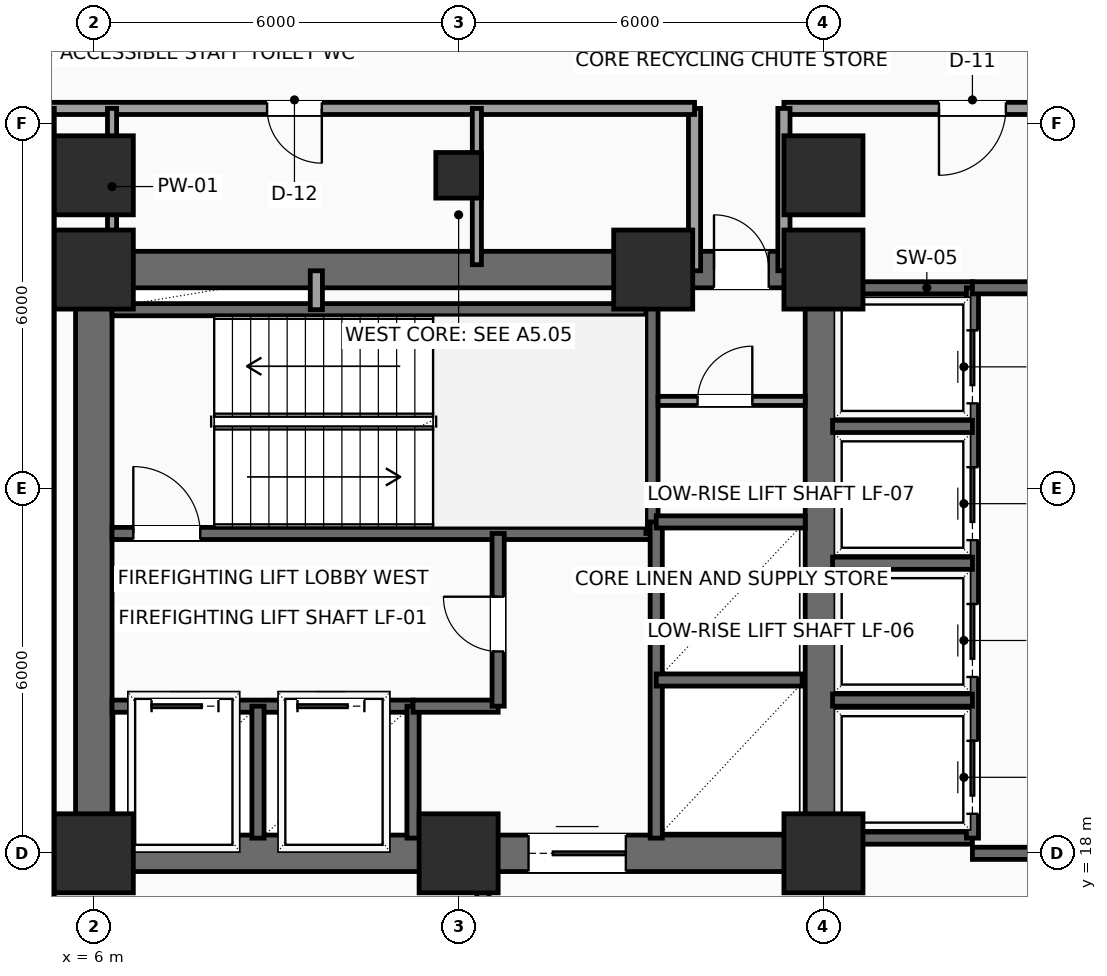
"""IFC4 building model, lengths in metres.
Left out: names, types, materials, properties, quantities, classifications, styles, units other than length and angle.
Written with IfcOpenShell. Run it as: python <this file> out.ifc"""

import sys

from ifc_helpers import new_model, si_unit, direction, frame, frame_2d, origin, origin_2d, place, context, subcontext, project, spatial, rectangle, hollow_rectangle, extrude, element, fill, save


model = new_model("IFC4")
c1 = context("Model", 3, precision=1e-05, world=origin(), true_north=direction((0.0, 1.0)))
c2 = subcontext(c1, "Body", "Model", "MODEL_VIEW")
j1 = project(units=[si_unit("LENGTHUNIT", "METRE"), si_unit("PLANEANGLEUNIT", "RADIAN")], contexts=[c1])
p1 = place(None, origin())
s1 = spatial("IfcSite", under=j1, at=p1, CompositionType="ELEMENT")
p2 = place(p1, origin())
s2 = spatial("IfcBuilding", under=s1, at=p2, CompositionType="ELEMENT")
p3 = place(p2, frame((0.0, 0.0, 79.2)))
s3 = spatial("IfcBuildingStorey", under=s2, at=p3, CompositionType="ELEMENT", Elevation=79.2)
for number, where, z_axis, x_axis in (
    (1, (6.0, 18.0, 0.0), (0.0, 0.0, 1.0), (1.0, 0.0, 0.0)),
    (2, (12.0, 18.0, 0.0), (0.0, 0.0, 1.0), (1.0, 0.0, 0.0)),
    (3, (18.0, 18.0, 0.0), (0.0, 0.0, 1.0), (1.0, 0.0, 0.0)),
    (4, (6.0, 27.6, 0.0), (0.0, 0.0, 1.0), (1.0, 0.0, 0.0)),
    (5, (15.2, 27.6, 0.0), (0.0, 0.0, 1.0), (1.0, 0.0, 0.0)),
    (6, (18.0, 27.6, 0.0), (0.0, 0.0, 1.0), (1.0, 0.0, 0.0)),
    (7, (6.0, 29.15, 0.0), (0.0, 0.0, 1.0), (1.0, 0.0, 0.0)),
):
    element("IfcColumn", number, at=place(p3, frame(where, z_axis=z_axis, x_axis=x_axis)), inside=s3, PredefinedType="COLUMN", context=c2, shape_type="SweptSolid", body=[
        extrude(rectangle(XDim=1.3, YDim=1.3, at=origin_2d()), origin(), (0.0, 0.0, 1.0), 3.9),
    ])
p4 = place(p3, frame((12.0, 29.15, 0.0), z_axis=(0.0, 0.0, 1.0), x_axis=(1.0, 0.0, 0.0)))
e8 = element("IfcColumn", 8, at=p4, inside=s3, PredefinedType="COLUMN", context=c2, shape_type="SweptSolid", body=[
    extrude(hollow_rectangle(XDim=0.75, YDim=0.75, WallThickness=0.035, InnerFilletRadius=0.035, OuterFilletRadius=0.05, at=origin_2d()), origin(), (0.0, 0.0, 1.0), 3.9),
])
p5 = place(p3, frame((18.0, 29.15, 0.0), z_axis=(0.0, 0.0, 1.0), x_axis=(1.0, 0.0, 0.0)))
e9 = element("IfcColumn", 9, at=p5, inside=s3, PredefinedType="COLUMN", context=c2, shape_type="SweptSolid", body=[
    extrude(rectangle(XDim=1.3, YDim=1.3, at=origin_2d()), origin(), (0.0, 0.0, 1.0), 3.9),
])
p6 = place(p3, frame((6.0, 18.0, 0.0), z_axis=(0.0, 0.0, 1.0), x_axis=(1.0, 0.0, 0.0)))
e10 = element("IfcWall", 10, at=p6, inside=s3, PredefinedType="SHEAR", context=c2, shape_type="SweptSolid", body=[
    extrude(rectangle(XDim=12.0, YDim=0.6, at=frame_2d((6.0, 0.0))), origin(), (0.0, 0.0, 1.0), 3.65),
])
p7 = place(p6, frame((7.15, 0.0, 0.0)))
e11 = element("IfcOpeningElement", 11, at=p7, cuts=e10, PredefinedType="OPENING", context=c2, shape_type="SweptSolid", body=[
    extrude(rectangle(XDim=1.6, YDim=2.3, at=frame_2d((0.8, 1.15))), frame((0.0, 0.31, 0.0), z_axis=(0.0, -1.0, 0.0), x_axis=(1.0, 0.0, 0.0)), (0.0, 0.0, 1.0), 0.62),
])
p8 = place(p3, frame((6.0, 27.6, 0.0), z_axis=(0.0, 0.0, 1.0), x_axis=(1.0, 0.0, 0.0)))
e12 = element("IfcWall", 12, at=p8, inside=s3, PredefinedType="SHEAR", context=c2, shape_type="SweptSolid", body=[
    extrude(rectangle(XDim=12.0, YDim=0.6, at=frame_2d((6.0, 0.0))), origin(), (0.0, 0.0, 1.0), 3.65),
])
p9 = place(p8, frame((10.2, 0.0, 0.0)))
e13 = element("IfcOpeningElement", 13, at=p9, cuts=e12, PredefinedType="OPENING", context=c2, shape_type="SweptSolid", body=[
    extrude(rectangle(XDim=0.9, YDim=2.15, at=frame_2d((0.45, 1.075))), frame((0.0, 0.31, 0.0), z_axis=(0.0, -1.0, 0.0), x_axis=(1.0, 0.0, 0.0)), (0.0, 0.0, 1.0), 0.62),
])
for number, where, z_axis, x_axis in (
    (14, (6.0, 18.0, 0.0), (0.0, 0.0, 1.0), (0.0, 1.0, 0.0)),
    (15, (18.0, 18.0, 0.0), (0.0, 0.0, 1.0), (0.0, 1.0, 0.0)),
):
    element("IfcWall", number, at=place(p3, frame(where, z_axis=z_axis, x_axis=x_axis)), inside=s3, PredefinedType="SHEAR", context=c2, shape_type="SweptSolid", body=[
        extrude(rectangle(XDim=9.6, YDim=0.6, at=frame_2d((4.8, 0.0))), origin(), (0.0, 0.0, 1.0), 3.65),
    ])
p10 = place(p3, frame((6.3, 23.26, 0.0), z_axis=(0.0, 0.0, 1.0), x_axis=(1.0, 0.0, 0.0)))
e16 = element("IfcWall", 16, at=p10, inside=s3, PredefinedType="SHEAR", context=c2, shape_type="SweptSolid", body=[
    extrude(rectangle(XDim=8.88, YDim=0.2, at=frame_2d((4.44, 0.0))), origin(), (0.0, 0.0, 1.0), 3.65),
])
p11 = place(p10, frame((0.35, 0.0, 0.0)))
e17 = element("IfcOpeningElement", 17, at=p11, cuts=e16, PredefinedType="OPENING", context=c2, shape_type="SweptSolid", body=[
    extrude(rectangle(XDim=1.1, YDim=2.2, at=frame_2d((0.55, 1.1))), frame((0.0, 0.11, 0.0), z_axis=(0.0, -1.0, 0.0), x_axis=(1.0, 0.0, 0.0)), (0.0, 0.0, 1.0), 0.22),
])
p12 = place(p3, frame((6.3, 26.94, 0.0), z_axis=(0.0, 0.0, 1.0), x_axis=(1.0, 0.0, 0.0)))
e18 = element("IfcWall", 18, at=p12, inside=s3, PredefinedType="SHEAR", context=c2, shape_type="SweptSolid", body=[
    extrude(rectangle(XDim=8.88, YDim=0.2, at=frame_2d((4.44, 0.0))), origin(), (0.0, 0.0, 1.0), 3.65),
])
p13 = place(p3, frame((15.18, 23.26, 0.0), z_axis=(0.0, 0.0, 1.0), x_axis=(0.0, 1.0, 0.0)))
e19 = element("IfcWall", 19, at=p13, inside=s3, PredefinedType="SHEAR", context=c2, shape_type="SweptSolid", body=[
    extrude(rectangle(XDim=4.04, YDim=0.2, at=frame_2d((2.02, 0.0))), origin(), (0.0, 0.0, 1.0), 3.65),
])
p14 = place(p3, frame((6.3, 20.42, 0.0), z_axis=(0.0, 0.0, 1.0), x_axis=(1.0, 0.0, 0.0)))
e20 = element("IfcWall", 20, at=p14, inside=s3, PredefinedType="SHEAR", context=c2, shape_type="SweptSolid", body=[
    extrude(rectangle(XDim=4.95, YDim=0.2, at=frame_2d((2.475, 0.0))), origin(), (0.0, 0.0, 1.0), 3.65),
])
p15 = place(p14, frame((0.65, 0.0, 0.0)))
e21 = element("IfcOpeningElement", 21, at=p15, cuts=e20, PredefinedType="OPENING", context=c2, shape_type="SweptSolid", body=[
    extrude(rectangle(XDim=1.1, YDim=2.2, at=frame_2d((0.55, 1.1))), frame((0.0, 0.11, 0.0), z_axis=(0.0, -1.0, 0.0), x_axis=(1.0, 0.0, 0.0)), (0.0, 0.0, 1.0), 0.22),
])
p16 = place(p14, frame((3.05, 0.0, 0.0)))
e22 = element("IfcOpeningElement", 22, at=p16, cuts=e20, PredefinedType="OPENING", context=c2, shape_type="SweptSolid", body=[
    extrude(rectangle(XDim=1.1, YDim=2.2, at=frame_2d((0.55, 1.1))), frame((0.0, 0.11, 0.0), z_axis=(0.0, -1.0, 0.0), x_axis=(1.0, 0.0, 0.0)), (0.0, 0.0, 1.0), 0.22),
])
for number, where, z_axis, x_axis in (
    (23, (8.7, 18.25, 0.0), (0.0, 0.0, 1.0), (0.0, 1.0, 0.0)),
    (24, (11.25, 18.25, 0.0), (0.0, 0.0, 1.0), (0.0, 1.0, 0.0)),
):
    element("IfcWall", number, at=place(p3, frame(where, z_axis=z_axis, x_axis=x_axis)), inside=s3, PredefinedType="SHEAR", context=c2, shape_type="SweptSolid", body=[
        extrude(rectangle(XDim=2.17, YDim=0.2, at=frame_2d((1.085, 0.0))), origin(), (0.0, 0.0, 1.0), 3.65),
    ])
p17 = place(p3, frame((11.25, 20.42, 0.0), z_axis=(0.0, 0.0, 1.0), x_axis=(1.0, 0.0, 0.0)))
e25 = element("IfcWall", 25, at=p17, inside=s3, PredefinedType="SHEAR", context=c2, shape_type="SweptSolid", body=[
    extrude(rectangle(XDim=1.4, YDim=0.2, at=frame_2d((0.7, 0.0))), origin(), (0.0, 0.0, 1.0), 3.65),
])
p18 = place(p3, frame((12.65, 20.42, 0.0), z_axis=(0.0, 0.0, 1.0), x_axis=(0.0, 1.0, 0.0)))
e26 = element("IfcWall", 26, at=p18, inside=s3, PredefinedType="SHEAR", context=c2, shape_type="SweptSolid", body=[
    extrude(rectangle(XDim=2.84, YDim=0.2, at=frame_2d((1.42, 0.0))), origin(), (0.0, 0.0, 1.0), 3.65),
])
p19 = place(p18, frame((0.9, 0.0, 0.0)))
e27 = element("IfcOpeningElement", 27, at=p19, cuts=e26, PredefinedType="OPENING", context=c2, shape_type="SweptSolid", body=[
    extrude(rectangle(XDim=0.9, YDim=2.15, at=frame_2d((0.45, 1.075))), frame((0.0, 0.11, 0.0), z_axis=(0.0, -1.0, 0.0), x_axis=(1.0, 0.0, 0.0)), (0.0, 0.0, 1.0), 0.22),
])
p20 = place(p3, frame((9.66, 26.94, 0.0), z_axis=(0.0, 0.0, 1.0), x_axis=(0.0, 1.0, 0.0)))
e28 = element("IfcWall", 28, at=p20, inside=s3, PredefinedType="SOLIDWALL", context=c2, shape_type="SweptSolid", body=[
    extrude(rectangle(XDim=0.64, YDim=0.2, at=frame_2d((0.32, 0.0))), origin(), (0.0, 0.0, 1.0), 3.65),
])
p21 = place(p3, frame((15.25, 18.25, 0.0), z_axis=(0.0, 0.0, 1.0), x_axis=(0.0, 1.0, 0.0)))
e29 = element("IfcWall", 29, at=p21, inside=s3, PredefinedType="SHEAR", context=c2, shape_type="SweptSolid", body=[
    extrude(rectangle(XDim=5.2, YDim=0.2, at=frame_2d((2.6, 0.0))), origin(), (0.0, 0.0, 1.0), 3.65),
])
p22 = place(p3, frame((15.25, 20.85, 0.0), z_axis=(0.0, 0.0, 1.0), x_axis=(1.0, 0.0, 0.0)))
e30 = element("IfcWall", 30, at=p22, inside=s3, PredefinedType="SHEAR", context=c2, shape_type="SweptSolid", body=[
    extrude(rectangle(XDim=2.4, YDim=0.2, at=frame_2d((1.2, 0.0))), origin(), (0.0, 0.0, 1.0), 3.65),
])
p23 = place(p3, frame((15.25, 23.45, 0.0), z_axis=(0.0, 0.0, 1.0), x_axis=(1.0, 0.0, 0.0)))
e31 = element("IfcWall", 31, at=p23, inside=s3, PredefinedType="SHEAR", context=c2, shape_type="SweptSolid", body=[
    extrude(rectangle(XDim=2.45, YDim=0.2, at=frame_2d((1.225, 0.0))), origin(), (0.0, 0.0, 1.0), 3.65),
])
p24 = place(p3, frame((15.28, 25.44, 0.0), z_axis=(0.0, 0.0, 1.0), x_axis=(1.0, 0.0, 0.0)))
e32 = element("IfcWall", 32, at=p24, inside=s3, PredefinedType="PARTITIONING", context=c2, shape_type="SweptSolid", body=[
    extrude(rectangle(XDim=2.42, YDim=0.15, at=frame_2d((1.21, 0.0))), origin(), (0.0, 0.0, 1.0), 3.65),
])
p25 = place(p24, frame((0.65, 0.0, 0.0)))
e33 = element("IfcOpeningElement", 33, at=p25, cuts=e32, PredefinedType="OPENING", context=c2, shape_type="SweptSolid", body=[
    extrude(rectangle(XDim=0.9, YDim=2.15, at=frame_2d((0.45, 1.075))), frame((0.0, 0.085, 0.0), z_axis=(0.0, -1.0, 0.0), x_axis=(1.0, 0.0, 0.0)), (0.0, 0.0, 1.0), 0.17),
])
for number, where, z_axis, x_axis in (
    (34, (18.1, 27.3, 0.0), (0.0, 0.0, 1.0), (1.0, 0.0, 0.0)),
    (35, (18.1, 18.25, 0.0), (0.0, 0.0, 1.0), (1.0, 0.0, 0.0)),
):
    element("IfcWall", number, at=place(p3, frame(where, z_axis=z_axis, x_axis=x_axis)), inside=s3, PredefinedType="SHEAR", context=c2, shape_type="SweptSolid", body=[
        extrude(rectangle(XDim=2.35, YDim=0.2, at=frame_2d((1.175, 0.0))), origin(), (0.0, 0.0, 1.0), 3.65),
    ])
p26 = place(p3, frame((20.45, 18.25, 0.0), z_axis=(0.0, 0.0, 1.0), x_axis=(0.0, 1.0, 0.0)))
e36 = element("IfcWall", 36, at=p26, inside=s3, PredefinedType="SHEAR", context=c2, shape_type="SweptSolid", body=[
    extrude(rectangle(XDim=9.05, YDim=0.2, at=frame_2d((4.525, 0.0))), origin(), (0.0, 0.0, 1.0), 3.65),
])
p27 = place(p26, frame((0.4, 0.0, 0.0)))
e37 = element("IfcOpeningElement", 37, at=p27, cuts=e36, PredefinedType="OPENING", context=c2, shape_type="SweptSolid", body=[
    extrude(rectangle(XDim=1.2, YDim=2.2, at=frame_2d((0.6, 1.1))), frame((0.0, 0.11, 0.0), z_axis=(0.0, -1.0, 0.0), x_axis=(1.0, 0.0, 0.0)), (0.0, 0.0, 1.0), 0.22),
])
p28 = place(p26, frame((2.65, 0.0, 0.0)))
e38 = element("IfcOpeningElement", 38, at=p28, cuts=e36, PredefinedType="OPENING", context=c2, shape_type="SweptSolid", body=[
    extrude(rectangle(XDim=1.2, YDim=2.2, at=frame_2d((0.6, 1.1))), frame((0.0, 0.11, 0.0), z_axis=(0.0, -1.0, 0.0), x_axis=(1.0, 0.0, 0.0)), (0.0, 0.0, 1.0), 0.22),
])
p29 = place(p26, frame((4.9, 0.0, 0.0)))
e39 = element("IfcOpeningElement", 39, at=p29, cuts=e36, PredefinedType="OPENING", context=c2, shape_type="SweptSolid", body=[
    extrude(rectangle(XDim=1.2, YDim=2.2, at=frame_2d((0.6, 1.1))), frame((0.0, 0.11, 0.0), z_axis=(0.0, -1.0, 0.0), x_axis=(1.0, 0.0, 0.0)), (0.0, 0.0, 1.0), 0.22),
])
p30 = place(p26, frame((7.15, 0.0, 0.0)))
e40 = element("IfcOpeningElement", 40, at=p30, cuts=e36, PredefinedType="OPENING", context=c2, shape_type="SweptSolid", body=[
    extrude(rectangle(XDim=1.2, YDim=2.2, at=frame_2d((0.6, 1.1))), frame((0.0, 0.11, 0.0), z_axis=(0.0, -1.0, 0.0), x_axis=(1.0, 0.0, 0.0)), (0.0, 0.0, 1.0), 0.22),
])
for number, where, z_axis, x_axis in (
    (41, (18.15, 20.52, 0.0), (0.0, 0.0, 1.0), (1.0, 0.0, 0.0)),
    (42, (18.15, 22.77, 0.0), (0.0, 0.0, 1.0), (1.0, 0.0, 0.0)),
    (43, (18.15, 25.02, 0.0), (0.0, 0.0, 1.0), (1.0, 0.0, 0.0)),
):
    element("IfcWall", number, at=place(p3, frame(where, z_axis=z_axis, x_axis=x_axis)), inside=s3, PredefinedType="SHEAR", context=c2, shape_type="SweptSolid", body=[
        extrude(rectangle(XDim=2.3, YDim=0.2, at=frame_2d((1.15, 0.0))), origin(), (0.0, 0.0, 1.0), 3.65),
    ])
p31 = place(p3, frame((20.45, 18.0, 0.0), z_axis=(0.0, 0.0, 1.0), x_axis=(1.0, 0.0, 0.0)))
e44 = element("IfcWall", 44, at=p31, inside=s3, PredefinedType="SHEAR", context=c2, shape_type="SweptSolid", body=[
    extrude(rectangle(XDim=3.5, YDim=0.2, at=frame_2d((1.75, 0.0))), origin(), (0.0, 0.0, 1.0), 3.65),
])
p32 = place(p31, frame((0.95, 0.0, 0.0)))
e45 = element("IfcOpeningElement", 45, at=p32, cuts=e44, PredefinedType="OPENING", context=c2, shape_type="SweptSolid", body=[
    extrude(rectangle(XDim=1.6, YDim=2.3, at=frame_2d((0.8, 1.15))), frame((0.0, 0.11, 0.0), z_axis=(0.0, -1.0, 0.0), x_axis=(1.0, 0.0, 0.0)), (0.0, 0.0, 1.0), 0.22),
])
p33 = place(p3, frame((20.45, 27.3, 0.0), z_axis=(0.0, 0.0, 1.0), x_axis=(1.0, 0.0, 0.0)))
e46 = element("IfcWall", 46, at=p33, inside=s3, PredefinedType="SHEAR", context=c2, shape_type="SweptSolid", body=[
    extrude(rectangle(XDim=3.5, YDim=0.2, at=frame_2d((1.75, 0.0))), origin(), (0.0, 0.0, 1.0), 3.65),
])
p34 = place(p3, frame((23.7, 30.25, 0.0), z_axis=(0.0, 0.0, 1.0), x_axis=(-1.0, 0.0, 0.0)))
e47 = element("IfcWall", 47, at=p34, inside=s3, PredefinedType="PARTITIONING", context=c2, shape_type="SweptSolid", body=[
    extrude(rectangle(XDim=6.35, YDim=0.2, at=frame_2d((3.175, 0.0))), origin(), (0.0, 0.0, 1.0), 3.65),
])
p35 = place(p34, frame((2.7, 0.0, 0.0)))
e48 = element("IfcOpeningElement", 48, at=p35, cuts=e47, PredefinedType="OPENING", context=c2, shape_type="SweptSolid", body=[
    extrude(rectangle(XDim=1.1, YDim=2.25, at=frame_2d((0.55, 1.125))), frame((0.0, 0.11, 0.0), z_axis=(0.0, -1.0, 0.0), x_axis=(1.0, 0.0, 0.0)), (0.0, 0.0, 1.0), 0.22),
])
for number, where, z_axis, x_axis in (
    (49, (17.35, 30.25, 0.0), (0.0, 0.0, 1.0), (0.0, -1.0, 0.0)),
    (50, (15.88, 27.58, 0.0), (0.0, 0.0, 1.0), (0.0, 1.0, 0.0)),
):
    element("IfcWall", number, at=place(p3, frame(where, z_axis=z_axis, x_axis=x_axis)), inside=s3, PredefinedType="PARTITIONING", context=c2, shape_type="SweptSolid", body=[
        extrude(rectangle(XDim=2.67, YDim=0.2, at=frame_2d((1.335, 0.0))), origin(), (0.0, 0.0, 1.0), 3.65),
    ])
p36 = place(p3, frame((15.88, 30.25, 0.0), z_axis=(0.0, 0.0, 1.0), x_axis=(-1.0, 0.0, 0.0)))
e51 = element("IfcWall", 51, at=p36, inside=s3, PredefinedType="PARTITIONING", context=c2, shape_type="SweptSolid", body=[
    extrude(rectangle(XDim=10.63, YDim=0.2, at=frame_2d((5.315, 0.0))), origin(), (0.0, 0.0, 1.0), 3.65),
])
p37 = place(p36, frame((6.13, 0.0, 0.0)))
e52 = element("IfcOpeningElement", 52, at=p37, cuts=e51, PredefinedType="OPENING", context=c2, shape_type="SweptSolid", body=[
    extrude(rectangle(XDim=0.9, YDim=2.1, at=frame_2d((0.45, 1.05))), frame((0.0, 0.11, 0.0), z_axis=(0.0, -1.0, 0.0), x_axis=(1.0, 0.0, 0.0)), (0.0, 0.0, 1.0), 0.22),
])
p38 = place(p3, frame((5.25, 30.25, 0.0), z_axis=(0.0, 0.0, 1.0), x_axis=(0.0, -1.0, 0.0)))
e53 = element("IfcWall", 53, at=p38, inside=s3, PredefinedType="PARTITIONING", context=c2, shape_type="SweptSolid", body=[
    extrude(rectangle(XDim=14.1, YDim=0.2, at=frame_2d((7.05, 0.0))), origin(), (0.0, 0.0, 1.0), 3.65),
])
p39 = place(p3, frame((12.4, 16.15, 0.0), z_axis=(0.0, 0.0, 1.0), x_axis=(0.0, 1.0, 0.0)))
e54 = element("IfcWall", 54, at=p39, inside=s3, PredefinedType="PARTITIONING", context=c2, shape_type="SweptSolid", body=[
    extrude(rectangle(XDim=1.8, YDim=0.2, at=frame_2d((0.9, 0.0))), origin(), (0.0, 0.0, 1.0), 3.65),
])
for number, where, z_axis, x_axis in (
    (55, (6.3, 27.68, 0.0), (0.0, 0.0, 1.0), (0.0, 1.0, 0.0)),
    (56, (12.3, 27.68, 0.0), (0.0, 0.0, 1.0), (0.0, 1.0, 0.0)),
):
    element("IfcWall", number, at=place(p3, frame(where, z_axis=z_axis, x_axis=x_axis)), inside=s3, PredefinedType="PARTITIONING", context=c2, shape_type="SweptSolid", body=[
        extrude(rectangle(XDim=2.57, YDim=0.15, at=frame_2d((1.285, 0.0))), origin(), (0.0, 0.0, 1.0), 2.992),
    ])
p40 = place(p7, origin())
e57 = element("IfcDoor", 57, at=p40, inside=s3, OperationType="DOUBLE_DOOR_SLIDING", PredefinedType="DOOR", context=c2, shape_type="SweptSolid", body=[
    extrude(rectangle(XDim=1.6, YDim=2.3, at=frame_2d((0.8, 1.15))), frame((0.0, 0.025, 0.0), z_axis=(0.0, -1.0, 0.0), x_axis=(1.0, 0.0, 0.0)), (0.0, 0.0, 1.0), 0.05),
])
fill(e11, e57)
p41 = place(p9, origin())
e58 = element("IfcDoor", 58, at=p41, inside=s3, OperationType="SINGLE_SWING_LEFT", PredefinedType="DOOR", context=c2, shape_type="SweptSolid", body=[
    extrude(rectangle(XDim=0.9, YDim=2.15, at=frame_2d((0.45, 1.075))), frame((0.0, 0.025, 0.0), z_axis=(0.0, -1.0, 0.0), x_axis=(1.0, 0.0, 0.0)), (0.0, 0.0, 1.0), 0.05),
])
fill(e13, e58)
p42 = place(p11, origin())
e59 = element("IfcDoor", 59, at=p42, inside=s3, OperationType="SINGLE_SWING_LEFT", PredefinedType="DOOR", context=c2, shape_type="SweptSolid", body=[
    extrude(rectangle(XDim=1.1, YDim=2.2, at=frame_2d((0.55, 1.1))), frame((0.0, 0.025, 0.0), z_axis=(0.0, -1.0, 0.0), x_axis=(1.0, 0.0, 0.0)), (0.0, 0.0, 1.0), 0.05),
])
fill(e17, e59)
p43 = place(p15, origin())
e60 = element("IfcDoor", 60, at=p43, inside=s3, OperationType="SLIDING_TO_LEFT", PredefinedType="DOOR", context=c2, shape_type="SweptSolid", body=[
    extrude(rectangle(XDim=1.1, YDim=2.2, at=frame_2d((0.55, 1.1))), frame((0.0, 0.025, 0.0), z_axis=(0.0, -1.0, 0.0), x_axis=(1.0, 0.0, 0.0)), (0.0, 0.0, 1.0), 0.05),
])
fill(e21, e60)
p44 = place(p16, origin())
e61 = element("IfcDoor", 61, at=p44, inside=s3, OperationType="SLIDING_TO_LEFT", PredefinedType="DOOR", context=c2, shape_type="SweptSolid", body=[
    extrude(rectangle(XDim=1.1, YDim=2.2, at=frame_2d((0.55, 1.1))), frame((0.0, 0.025, 0.0), z_axis=(0.0, -1.0, 0.0), x_axis=(1.0, 0.0, 0.0)), (0.0, 0.0, 1.0), 0.05),
])
fill(e22, e61)
p45 = place(p19, origin())
e62 = element("IfcDoor", 62, at=p45, inside=s3, OperationType="SINGLE_SWING_RIGHT", PredefinedType="DOOR", context=c2, shape_type="SweptSolid", body=[
    extrude(rectangle(XDim=0.9, YDim=2.15, at=frame_2d((0.45, 1.075))), frame((0.0, 0.025, 0.0), z_axis=(0.0, -1.0, 0.0), x_axis=(1.0, 0.0, 0.0)), (0.0, 0.0, 1.0), 0.05),
])
fill(e27, e62)
p46 = place(p25, origin())
e63 = element("IfcDoor", 63, at=p46, inside=s3, OperationType="SINGLE_SWING_RIGHT", PredefinedType="DOOR", context=c2, shape_type="SweptSolid", body=[
    extrude(rectangle(XDim=0.9, YDim=2.15, at=frame_2d((0.45, 1.075))), frame((0.0, 0.025, 0.0), z_axis=(0.0, -1.0, 0.0), x_axis=(1.0, 0.0, 0.0)), (0.0, 0.0, 1.0), 0.05),
])
fill(e33, e63)
p47 = place(p27, origin())
e64 = element("IfcDoor", 64, at=p47, inside=s3, OperationType="SLIDING_TO_RIGHT", PredefinedType="DOOR", context=c2, shape_type="SweptSolid", body=[
    extrude(rectangle(XDim=1.2, YDim=2.2, at=frame_2d((0.6, 1.1))), frame((0.0, 0.025, 0.0), z_axis=(0.0, -1.0, 0.0), x_axis=(1.0, 0.0, 0.0)), (0.0, 0.0, 1.0), 0.05),
])
fill(e37, e64)
p48 = place(p28, origin())
e65 = element("IfcDoor", 65, at=p48, inside=s3, OperationType="SLIDING_TO_RIGHT", PredefinedType="DOOR", context=c2, shape_type="SweptSolid", body=[
    extrude(rectangle(XDim=1.2, YDim=2.2, at=frame_2d((0.6, 1.1))), frame((0.0, 0.025, 0.0), z_axis=(0.0, -1.0, 0.0), x_axis=(1.0, 0.0, 0.0)), (0.0, 0.0, 1.0), 0.05),
])
fill(e38, e65)
p49 = place(p29, origin())
e66 = element("IfcDoor", 66, at=p49, inside=s3, OperationType="SLIDING_TO_RIGHT", PredefinedType="DOOR", context=c2, shape_type="SweptSolid", body=[
    extrude(rectangle(XDim=1.2, YDim=2.2, at=frame_2d((0.6, 1.1))), frame((0.0, 0.025, 0.0), z_axis=(0.0, -1.0, 0.0), x_axis=(1.0, 0.0, 0.0)), (0.0, 0.0, 1.0), 0.05),
])
fill(e39, e66)
p50 = place(p30, origin())
e67 = element("IfcDoor", 67, at=p50, inside=s3, OperationType="SLIDING_TO_RIGHT", PredefinedType="DOOR", context=c2, shape_type="SweptSolid", body=[
    extrude(rectangle(XDim=1.2, YDim=2.2, at=frame_2d((0.6, 1.1))), frame((0.0, 0.025, 0.0), z_axis=(0.0, -1.0, 0.0), x_axis=(1.0, 0.0, 0.0)), (0.0, 0.0, 1.0), 0.05),
])
fill(e40, e67)
p51 = place(p35, origin())
e68 = element("IfcDoor", 68, at=p51, inside=s3, OperationType="SINGLE_SWING_RIGHT", PredefinedType="DOOR", context=c2, shape_type="SweptSolid", body=[
    extrude(rectangle(XDim=1.1, YDim=2.25, at=frame_2d((0.55, 1.125))), frame((0.0, 0.025, 0.0), z_axis=(0.0, -1.0, 0.0), x_axis=(1.0, 0.0, 0.0)), (0.0, 0.0, 1.0), 0.05),
])
fill(e48, e68)
p52 = place(p37, origin())
e69 = element("IfcDoor", 69, at=p52, inside=s3, OperationType="SINGLE_SWING_LEFT", PredefinedType="DOOR", context=c2, shape_type="SweptSolid", body=[
    extrude(rectangle(XDim=0.9, YDim=2.1, at=frame_2d((0.45, 1.05))), frame((0.0, 0.025, 0.0), z_axis=(0.0, -1.0, 0.0), x_axis=(1.0, 0.0, 0.0)), (0.0, 0.0, 1.0), 0.05),
])
fill(e52, e69)
save(model, sys.argv[1])
